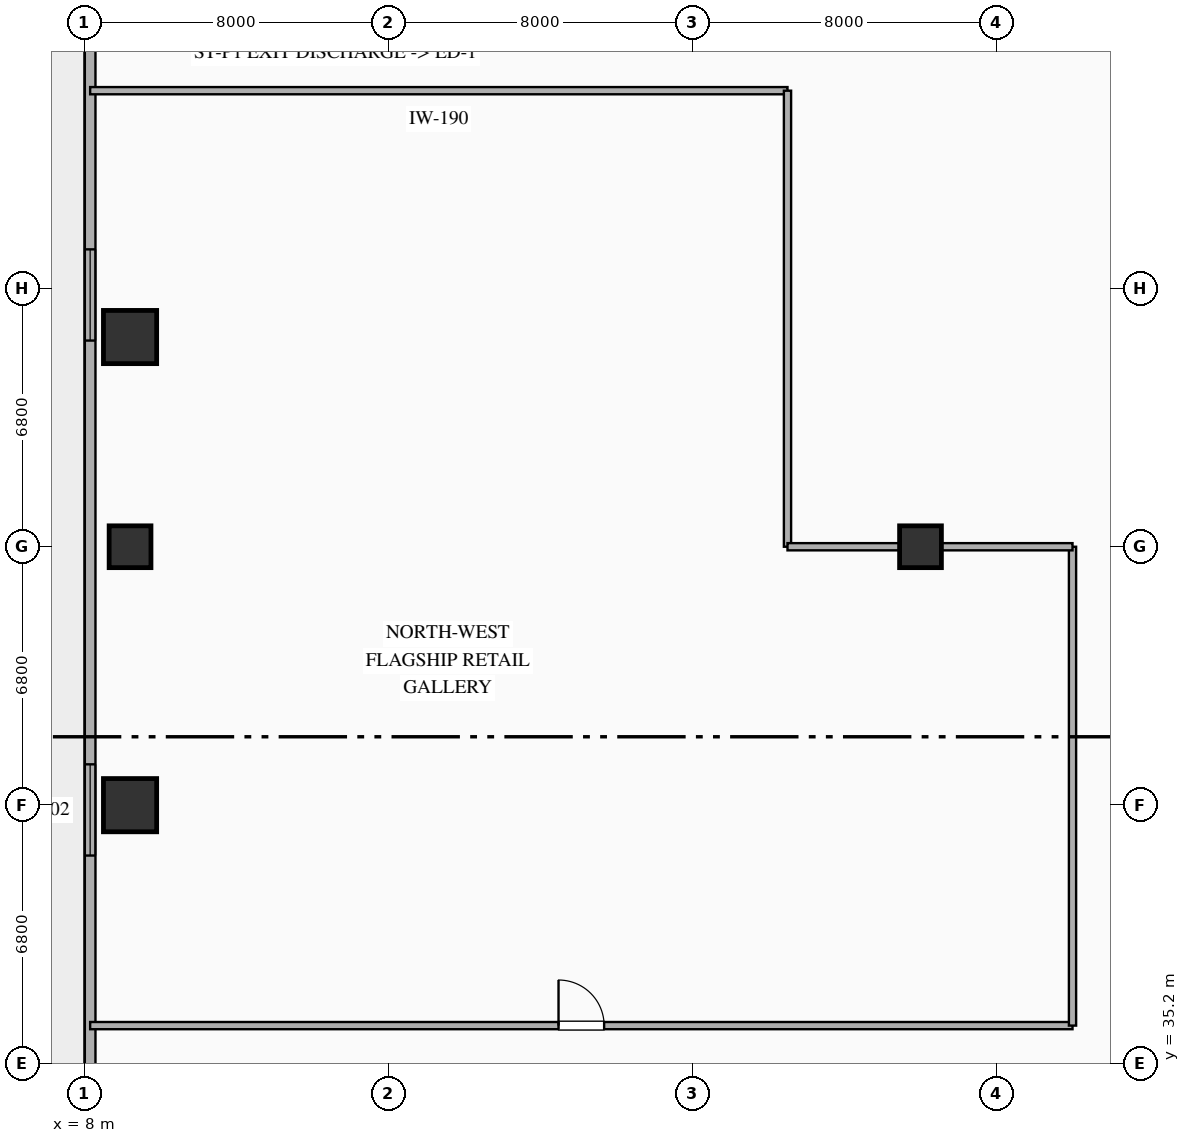
"""IFC4 building model, lengths in metres.
Left out: names, types, materials, properties, quantities, classifications, styles, units other than length and angle.
Written with IfcOpenShell. Run it as: python <this file> out.ifc"""

import sys

from ifc_helpers import new_model, si_unit, direction, frame, frame_2d, origin, origin_2d, place, context, subcontext, project, spatial, rectangle, extrude, element, fill, save


model = new_model("IFC4")
c1 = context("Model", 3, precision=1e-05, world=origin(), true_north=direction((0.0, 1.0)))
c2 = subcontext(c1, "Body", "Model", "MODEL_VIEW")
j1 = project(units=[si_unit("LENGTHUNIT", "METRE"), si_unit("PLANEANGLEUNIT", "RADIAN")], contexts=[c1])
p1 = place(None, origin())
s1 = spatial("IfcSite", under=j1, at=p1, CompositionType="ELEMENT")
p2 = place(p1, origin())
s2 = spatial("IfcBuilding", under=s1, at=p2, CompositionType="ELEMENT")
p3 = place(p2, origin())
s3 = spatial("IfcBuildingStorey", under=s2, at=p3, CompositionType="ELEMENT", Elevation=0.0)
for number, where, z_axis, x_axis in (
    (1, (9.2, 48.8, 0.0), (0.0, 0.0, 1.0), (1.0, 0.0, 0.0)),
    (2, (30.0, 48.8, 0.0), (0.0, 0.0, 1.0), (1.0, 0.0, 0.0)),
):
    element("IfcColumn", number, at=place(p3, frame(where, z_axis=z_axis, x_axis=x_axis)), inside=s3, PredefinedType="COLUMN", context=c2, shape_type="SweptSolid", body=[
        extrude(rectangle(XDim=1.1, YDim=1.1, at=origin_2d()), origin(), (0.0, 0.0, 1.0), 5.72),
    ])
for number, where, z_axis, x_axis in (
    (3, (9.2, 54.318, 0.0), (0.0, 0.0, 1.0), (1.0, 0.0, 0.0)),
    (4, (9.2, 42.0, 0.0), (0.0, 0.0, 1.0), (1.0, 0.0, 0.0)),
):
    element("IfcColumn", number, at=place(p3, frame(where, z_axis=z_axis, x_axis=x_axis)), inside=s3, PredefinedType="COLUMN", context=c2, shape_type="SweptSolid", body=[
        extrude(rectangle(XDim=1.4, YDim=1.4, at=origin_2d()), origin(), (0.0, 0.0, 1.0), 5.72),
    ])
p4 = place(p3, frame((8.15, 33.0, 0.0), z_axis=(0.0, 0.0, 1.0), x_axis=(0.0, 1.0, 0.0)))
e5 = element("IfcWall", 5, at=p4, inside=s3, PredefinedType="SOLIDWALL", context=c2, shape_type="SweptSolid", body=[
    extrude(rectangle(XDim=41.35, YDim=0.28, at=frame_2d((20.675, 0.0))), origin(), (0.0, 0.0, 1.0), 5.72),
])
p5 = place(p4, frame((33.6, 0.0, 0.0)))
e6 = element("IfcOpeningElement", 6, at=p5, cuts=e5, PredefinedType="OPENING", context=c2, shape_type="SweptSolid", body=[
    extrude(rectangle(XDim=2.4, YDim=2.6, at=frame_2d((1.2, 1.3))), frame((0.0, 0.15, 0.0), z_axis=(0.0, -1.0, 0.0), x_axis=(1.0, 0.0, 0.0)), (0.0, 0.0, 1.0), 0.3),
])
p6 = place(p4, frame((7.675, 0.0, 0.9)))
e7 = element("IfcOpeningElement", 7, at=p6, cuts=e5, PredefinedType="OPENING", context=c2, shape_type="SweptSolid", body=[
    extrude(rectangle(XDim=2.4, YDim=2.6, at=frame_2d((1.2, 1.3))), frame((0.0, 0.15, 0.0), z_axis=(0.0, -1.0, 0.0), x_axis=(1.0, 0.0, 0.0)), (0.0, 0.0, 1.0), 0.3),
])
p7 = place(p4, frame((21.225, 0.0, 0.9)))
e8 = element("IfcOpeningElement", 8, at=p7, cuts=e5, PredefinedType="OPENING", context=c2, shape_type="SweptSolid", body=[
    extrude(rectangle(XDim=2.4, YDim=2.6, at=frame_2d((1.2, 1.3))), frame((0.0, 0.15, 0.0), z_axis=(0.0, -1.0, 0.0), x_axis=(1.0, 0.0, 0.0)), (0.0, 0.0, 1.0), 0.3),
])
p8 = place(p3, frame((8.15, 36.2, 0.0), z_axis=(0.0, 0.0, 1.0), x_axis=(1.0, 0.0, 0.0)))
e9 = element("IfcWall", 9, at=p8, inside=s3, PredefinedType="PARTITIONING", context=c2, shape_type="SweptSolid", body=[
    extrude(rectangle(XDim=25.85, YDim=0.19, at=frame_2d((12.925, 0.0))), origin(), (0.0, 0.0, 1.0), 4.92),
])
p9 = place(p8, frame((12.325, 0.0, 0.0)))
e10 = element("IfcOpeningElement", 10, at=p9, cuts=e9, PredefinedType="OPENING", context=c2, shape_type="SweptSolid", body=[
    extrude(rectangle(XDim=1.2, YDim=2.25, at=frame_2d((0.6, 1.125))), frame((0.0, 0.105, 0.0), z_axis=(0.0, -1.0, 0.0), x_axis=(1.0, 0.0, 0.0)), (0.0, 0.0, 1.0), 0.21),
])
p10 = place(p3, frame((26.5, 60.8, 0.0), z_axis=(0.0, 0.0, 1.0), x_axis=(-1.0, 0.0, 0.0)))
e11 = element("IfcWall", 11, at=p10, inside=s3, PredefinedType="PARTITIONING", context=c2, shape_type="SweptSolid", body=[
    extrude(rectangle(XDim=18.35, YDim=0.19, at=frame_2d((9.175, 0.0))), origin(), (0.0, 0.0, 1.0), 4.92),
])
p11 = place(p3, frame((34.0, 36.2, 0.0), z_axis=(0.0, 0.0, 1.0), x_axis=(0.0, 1.0, 0.0)))
e12 = element("IfcWall", 12, at=p11, inside=s3, PredefinedType="PARTITIONING", context=c2, shape_type="SweptSolid", body=[
    extrude(rectangle(XDim=12.6, YDim=0.19, at=frame_2d((6.3, 0.0))), origin(), (0.0, 0.0, 1.0), 4.92),
])
p12 = place(p3, frame((26.5, 48.8, 0.0), z_axis=(0.0, 0.0, 1.0), x_axis=(0.0, 1.0, 0.0)))
e13 = element("IfcWall", 13, at=p12, inside=s3, PredefinedType="PARTITIONING", context=c2, shape_type="SweptSolid", body=[
    extrude(rectangle(XDim=12.0, YDim=0.19, at=frame_2d((6.0, 0.0))), origin(), (0.0, 0.0, 1.0), 4.92),
])
p13 = place(p3, frame((34.0, 48.8, 0.0), z_axis=(0.0, 0.0, 1.0), x_axis=(-1.0, 0.0, 0.0)))
e14 = element("IfcWall", 14, at=p13, inside=s3, PredefinedType="PARTITIONING", context=c2, shape_type="SweptSolid", body=[
    extrude(rectangle(XDim=7.5, YDim=0.19, at=frame_2d((3.75, 0.0))), origin(), (0.0, 0.0, 1.0), 4.92),
])
p14 = place(p6, origin())
e15 = element("IfcWindow", 15, at=p14, inside=s3, PartitioningType="SINGLE_PANEL", PredefinedType="WINDOW", context=c2, shape_type="SweptSolid", body=[
    extrude(rectangle(XDim=2.4, YDim=2.6, at=frame_2d((1.2, 1.3))), frame((0.0, 0.03, 0.0), z_axis=(0.0, -1.0, 0.0), x_axis=(1.0, 0.0, 0.0)), (0.0, 0.0, 1.0), 0.06),
])
fill(e7, e15)
p15 = place(p7, origin())
e16 = element("IfcWindow", 16, at=p15, inside=s3, PartitioningType="SINGLE_PANEL", PredefinedType="WINDOW", context=c2, shape_type="SweptSolid", body=[
    extrude(rectangle(XDim=2.4, YDim=2.6, at=frame_2d((1.2, 1.3))), frame((0.0, 0.03, 0.0), z_axis=(0.0, -1.0, 0.0), x_axis=(1.0, 0.0, 0.0)), (0.0, 0.0, 1.0), 0.06),
])
fill(e8, e16)
p16 = place(p9, origin())
e17 = element("IfcDoor", 17, at=p16, inside=s3, OperationType="SINGLE_SWING_LEFT", PredefinedType="DOOR", context=c2, shape_type="SweptSolid", body=[
    extrude(rectangle(XDim=1.2, YDim=2.25, at=frame_2d((0.6, 1.125))), frame((0.0, 0.025, 0.0), z_axis=(0.0, -1.0, 0.0), x_axis=(1.0, 0.0, 0.0)), (0.0, 0.0, 1.0), 0.05),
])
fill(e10, e17)
save(model, sys.argv[1])
